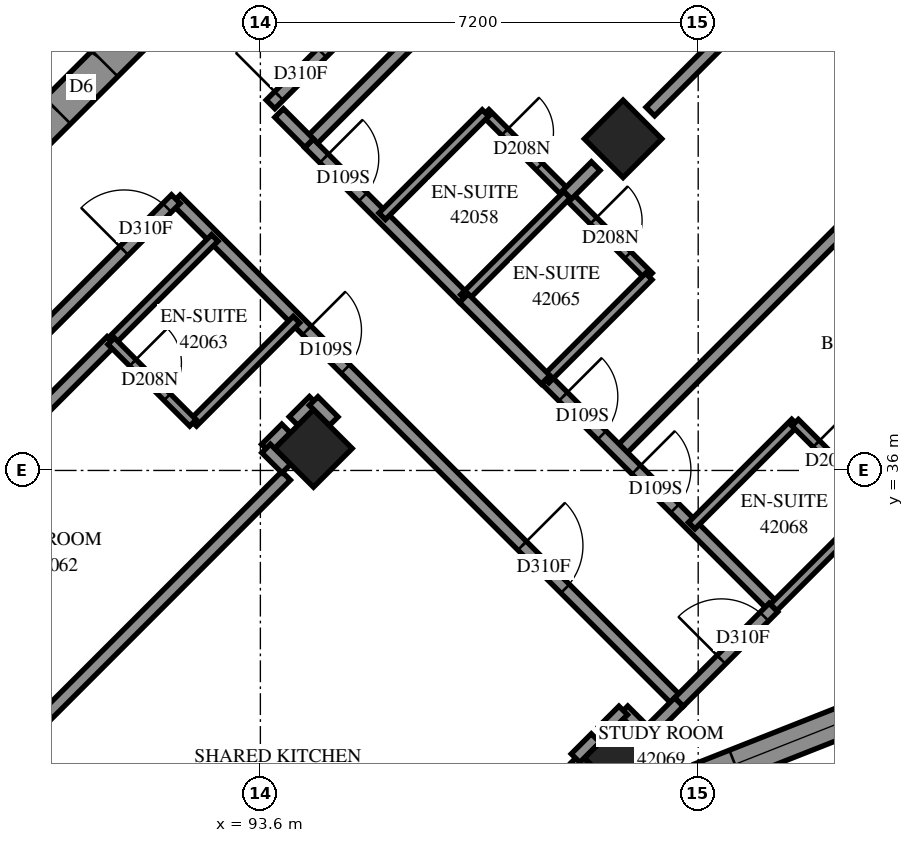
"""IFC4 building model, lengths in metres.
Left out: names, types, materials, properties, quantities, classifications, styles, units other than length and angle.
Written with IfcOpenShell. Run it as: python <this file> out.ifc"""

import sys

from ifc_helpers import new_model, si_unit, direction, frame, frame_2d, origin, origin_2d, place, context, subcontext, project, spatial, polyline, rectangle, outline, extrude, element, fill, save


model = new_model("IFC4")
c1 = context("Model", 3, precision=1e-05, world=origin(), true_north=direction((0.0, 1.0)))
c2 = subcontext(c1, "Body", "Model", "MODEL_VIEW")
j1 = project(units=[si_unit("LENGTHUNIT", "METRE"), si_unit("PLANEANGLEUNIT", "RADIAN")], contexts=[c1])
p1 = place(None, origin())
s1 = spatial("IfcSite", under=j1, at=p1, CompositionType="ELEMENT")
p2 = place(p1, origin())
s2 = spatial("IfcBuilding", under=s1, at=p2, CompositionType="ELEMENT")
p3 = place(p2, frame((0.0, 0.0, 155.8)))
s3 = spatial("IfcBuildingStorey", under=s2, at=p3, CompositionType="ELEMENT", Elevation=155.8)
for number, where, z_axis, x_axis in (
    (1, (99.565, 41.453, 0.0), (0.0, 0.0, 1.0), (0.707, -0.707, 0.0)),
    (2, (94.474, 36.362, 0.0), (0.0, 0.0, 1.0), (0.707, -0.707, 0.0)),
    (3, (99.565, 31.271, 0.0), (0.0, 0.0, 1.0), (0.707, -0.707, 0.0)),
):
    element("IfcColumn", number, at=place(p3, frame(where, z_axis=z_axis, x_axis=x_axis)), inside=s3, PredefinedType="COLUMN", context=c2, shape_type="SweptSolid", body=[
        extrude(rectangle(XDim=0.9, YDim=0.9, at=origin_2d()), origin(), (0.0, 0.0, 1.0), 3.1),
    ])
p4 = place(p3, frame((87.049, 38.695, -0.3), z_axis=(0.0, 0.0, 1.0), x_axis=(0.7071067812, 0.7071067812, 0.0)))
e4 = element("IfcWall", 4, at=p4, inside=s3, PredefinedType="SHEAR", context=c2, shape_type="SweptSolid", body=[
    extrude(rectangle(XDim=14.4, YDim=0.6, at=frame_2d((7.2, 0.0))), origin(), (0.0, 0.0, 1.0), 2.7),
])
p5 = place(p4, frame((4.55, 0.0, 0.3)))
e5 = element("IfcOpeningElement", 5, at=p5, cuts=e4, PredefinedType="OPENING", context=c2, shape_type="SweptSolid", body=[
    extrude(rectangle(XDim=1.1, YDim=2.1, at=frame_2d((0.55, 1.05))), frame((0.0, 0.31, 0.0), z_axis=(0.0, -1.0, 0.0), x_axis=(1.0, 0.0, 0.0)), (0.0, 0.0, 1.0), 0.62),
])
p6 = place(p4, frame((11.35, 0.0, 0.3)))
e6 = element("IfcOpeningElement", 6, at=p6, cuts=e4, PredefinedType="OPENING", context=c2, shape_type="SweptSolid", body=[
    extrude(rectangle(XDim=1.1, YDim=2.1, at=frame_2d((0.55, 1.05))), frame((0.0, 0.31, 0.0), z_axis=(0.0, -1.0, 0.0), x_axis=(1.0, 0.0, 0.0)), (0.0, 0.0, 1.0), 0.62),
])
p7 = place(p3, frame((100.828, 30.939, 0.0), z_axis=(0.0, 0.0, 1.0), x_axis=(0.930134551, 0.3672188953, 0.0)))
e7 = element("IfcWall", 7, at=p7, inside=s3, PredefinedType="SOLIDWALL", context=c2, shape_type="SweptSolid", body=[
    extrude(outline(polyline([(0.108, -0.25), (5.636, -0.25), (5.409, 0.25), (-0.108, 0.25), (0.108, -0.25)])), origin(), (0.0, 0.0, 1.0), 3.1),
])
p8 = place(p7, frame((0.62, 0.0, 0.45)))
e8 = element("IfcOpeningElement", 8, at=p8, cuts=e7, PredefinedType="OPENING", context=c2, shape_type="SweptSolid", body=[
    extrude(rectangle(XDim=2.8, YDim=2.5, at=frame_2d((1.4, 1.25))), frame((0.0, 0.26, 0.0), z_axis=(0.0, -1.0, 0.0), x_axis=(1.0, 0.0, 0.0)), (0.0, 0.0, 1.0), 0.52),
])
p9 = place(p3, frame((94.401, 41.383, 0.0), z_axis=(0.0, 0.0, 1.0), x_axis=(0.7071067812, 0.7071067812, 0.0)))
e9 = element("IfcWall", 9, at=p9, inside=s3, PredefinedType="PARTITIONING", context=c2, shape_type="SweptSolid", body=[
    extrude(rectangle(XDim=12.014, YDim=0.2, at=frame_2d((6.007, 0.0))), origin(), (0.0, 0.0, 1.0), 3.1),
])
p10 = place(p3, frame((92.209, 40.459, 0.0), z_axis=(0.0, 0.0, 1.0), x_axis=(0.7071067812, -0.7071067812, 0.0)))
e10 = element("IfcWall", 10, at=p10, inside=s3, PredefinedType="PARTITIONING", context=c2, shape_type="SweptSolid", body=[
    extrude(rectangle(XDim=11.698, YDim=0.2, at=frame_2d((5.849, 0.0))), origin(), (0.0, 0.0, 1.0), 3.1),
])
p11 = place(p10, frame((3.047, 0.0, 0.0)))
e11 = element("IfcOpeningElement", 11, at=p11, cuts=e10, PredefinedType="OPENING", context=c2, shape_type="SweptSolid", body=[
    extrude(rectangle(XDim=0.9, YDim=2.1, at=frame_2d((0.45, 1.05))), frame((0.0, 0.11, 0.0), z_axis=(0.0, -1.0, 0.0), x_axis=(1.0, 0.0, 0.0)), (0.0, 0.0, 1.0), 0.22),
])
p12 = place(p10, frame((8.056, 0.0, 0.0)))
e12 = element("IfcOpeningElement", 12, at=p12, cuts=e10, PredefinedType="OPENING", context=c2, shape_type="SweptSolid", body=[
    extrude(rectangle(XDim=1.0, YDim=2.1, at=frame_2d((0.5, 1.05))), frame((0.0, 0.11, 0.0), z_axis=(0.0, -1.0, 0.0), x_axis=(1.0, 0.0, 0.0)), (0.0, 0.0, 1.0), 0.22),
])
p13 = place(p3, frame((93.767, 42.021, 0.0), z_axis=(0.0, 0.0, 1.0), x_axis=(0.7071067812, 0.7071067812, 0.0)))
e13 = element("IfcWall", 13, at=p13, inside=s3, PredefinedType="PARTITIONING", context=c2, shape_type="SweptSolid", body=[
    extrude(rectangle(XDim=9.998, YDim=0.2, at=frame_2d((4.999, 0.0))), origin(), (0.0, 0.0, 1.0), 3.1),
])
p14 = place(p13, frame((0.196, 0.0, 0.0)))
e14 = element("IfcOpeningElement", 14, at=p14, cuts=e13, PredefinedType="OPENING", context=c2, shape_type="SweptSolid", body=[
    extrude(rectangle(XDim=1.0, YDim=2.1, at=frame_2d((0.5, 1.05))), frame((0.0, 0.11, 0.0), z_axis=(0.0, -1.0, 0.0), x_axis=(1.0, 0.0, 0.0)), (0.0, 0.0, 1.0), 0.22),
])
p15 = place(p3, frame((86.837, 35.091, 0.0), z_axis=(0.0, 0.0, 1.0), x_axis=(0.7071067812, 0.7071067812, 0.0)))
e15 = element("IfcWall", 15, at=p15, inside=s3, PredefinedType="PARTITIONING", context=c2, shape_type="SweptSolid", body=[
    extrude(rectangle(XDim=7.597, YDim=0.2, at=frame_2d((3.799, 0.0))), origin(), (0.0, 0.0, 1.0), 3.1),
])
p16 = place(p15, frame((6.395, 0.0, 0.0)))
e16 = element("IfcOpeningElement", 16, at=p16, cuts=e15, PredefinedType="OPENING", context=c2, shape_type="SweptSolid", body=[
    extrude(rectangle(XDim=1.0, YDim=2.1, at=frame_2d((0.5, 1.05))), frame((0.0, 0.11, 0.0), z_axis=(0.0, -1.0, 0.0), x_axis=(1.0, 0.0, 0.0)), (0.0, 0.0, 1.0), 0.22),
])
p17 = place(p3, frame((86.33, 33.311, 0.0), z_axis=(0.0, 0.0, 1.0), x_axis=(0.7071067812, 0.7071067812, 0.0)))
e17 = element("IfcWall", 17, at=p17, inside=s3, PredefinedType="PARTITIONING", context=c2, shape_type="SweptSolid", body=[
    extrude(rectangle(XDim=6.816, YDim=0.2, at=frame_2d((3.408, 0.0))), origin(), (0.0, 0.0, 1.0), 3.1),
])
p18 = place(p3, frame((99.494, 36.292, 0.0), z_axis=(0.0, 0.0, 1.0), x_axis=(0.7071067812, 0.7071067812, 0.0)))
e18 = element("IfcWall", 18, at=p18, inside=s3, PredefinedType="PARTITIONING", context=c2, shape_type="SweptSolid", body=[
    extrude(rectangle(XDim=6.799, YDim=0.2, at=frame_2d((3.4, 0.0))), origin(), (0.0, 0.0, 1.0), 3.1),
])
for number, where, z_axis, x_axis in (
    (19, (89.831, 31.721, 0.0), (0.0, 0.0, 1.0), (0.707, 0.707, 0.0)),
    (20, (100.013, 41.903, 0.0), (0.0, 0.0, 1.0), (0.707, 0.707, 0.0)),
):
    element("IfcWall", number, at=place(p3, frame(where, z_axis=z_axis, x_axis=x_axis)), inside=s3, PredefinedType="PARTITIONING", context=c2, shape_type="SweptSolid", body=[
        extrude(rectangle(XDim=5.928, YDim=0.2, at=frame_2d((2.964, 0.0))), origin(), (0.0, 0.0, 1.0), 3.1),
    ])
p19 = place(p3, frame((98.295, 37.497, 0.0), z_axis=(0.0, 0.0, 1.0), x_axis=(0.7071067812, -0.7071067812, 0.0)))
e21 = element("IfcWall", 21, at=p19, inside=s3, PredefinedType="PARTITIONING", context=c2, shape_type="SweptSolid", body=[
    extrude(rectangle(XDim=5.301, YDim=0.2, at=frame_2d((2.65, 0.0))), origin(), (0.0, 0.0, 1.0), 3.1),
])
p20 = place(p19, frame((0.401, 0.0, 0.0)))
e22 = element("IfcOpeningElement", 22, at=p20, cuts=e21, PredefinedType="OPENING", context=c2, shape_type="SweptSolid", body=[
    extrude(rectangle(XDim=0.9, YDim=2.1, at=frame_2d((0.45, 1.05))), frame((0.0, 0.11, 0.0), z_axis=(0.0, -1.0, 0.0), x_axis=(1.0, 0.0, 0.0)), (0.0, 0.0, 1.0), 0.22),
])
p21 = place(p19, frame((2.1, 0.0, 0.0)))
e23 = element("IfcOpeningElement", 23, at=p21, cuts=e21, PredefinedType="OPENING", context=c2, shape_type="SweptSolid", body=[
    extrude(rectangle(XDim=0.9, YDim=2.1, at=frame_2d((0.45, 1.05))), frame((0.0, 0.11, 0.0), z_axis=(0.0, -1.0, 0.0), x_axis=(1.0, 0.0, 0.0)), (0.0, 0.0, 1.0), 0.22),
])
p22 = place(p3, frame((97.305, 41.881, 0.0), z_axis=(0.0, 0.0, 1.0), x_axis=(0.7067382634, -0.707475107, 0.0)))
e24 = element("IfcWall", 24, at=p22, inside=s3, PredefinedType="PARTITIONING", context=c2, shape_type="SweptSolid", body=[
    extrude(rectangle(XDim=3.8, YDim=0.15, at=frame_2d((1.9, 0.0))), origin(), (0.0, 0.0, 1.0), 3.1),
])
p23 = place(p22, frame((0.445, 0.0, 0.0)))
e25 = element("IfcOpeningElement", 25, at=p23, cuts=e24, PredefinedType="OPENING", context=c2, shape_type="SweptSolid", body=[
    extrude(rectangle(XDim=0.8, YDim=2.1, at=frame_2d((0.4, 1.05))), frame((0.0, 0.085, 0.0), z_axis=(0.0, -1.0, 0.0), x_axis=(1.0, 0.0, 0.0)), (0.0, 0.0, 1.0), 0.17),
])
p24 = place(p22, frame((2.507, 0.0, 0.0)))
e26 = element("IfcOpeningElement", 26, at=p24, cuts=e24, PredefinedType="OPENING", context=c2, shape_type="SweptSolid", body=[
    extrude(rectangle(XDim=0.8, YDim=2.1, at=frame_2d((0.4, 1.05))), frame((0.0, 0.085, 0.0), z_axis=(0.0, -1.0, 0.0), x_axis=(1.0, 0.0, 0.0)), (0.0, 0.0, 1.0), 0.17),
])
p25 = place(p3, frame((94.399, 41.379, 0.0), z_axis=(0.0, 0.0, 1.0), x_axis=(0.7071067812, -0.7071067812, 0.0)))
e27 = element("IfcWall", 27, at=p25, inside=s3, PredefinedType="PARTITIONING", context=c2, shape_type="SweptSolid", body=[
    extrude(rectangle(XDim=3.601, YDim=0.2, at=frame_2d((1.8, 0.0))), origin(), (0.0, 0.0, 1.0), 3.1),
])
p26 = place(p25, frame((0.35, 0.0, 0.0)))
e28 = element("IfcOpeningElement", 28, at=p26, cuts=e27, PredefinedType="OPENING", context=c2, shape_type="SweptSolid", body=[
    extrude(rectangle(XDim=0.9, YDim=2.1, at=frame_2d((0.45, 1.05))), frame((0.0, 0.11, 0.0), z_axis=(0.0, -1.0, 0.0), x_axis=(1.0, 0.0, 0.0)), (0.0, 0.0, 1.0), 0.22),
])
for number, where, z_axis, x_axis in (
    (29, (95.603, 40.181, 0.0), (0.0, 0.0, 1.0), (0.707, 0.707, 0.0)),
    (30, (96.947, 38.837, 0.0), (0.0, 0.0, 1.0), (0.707, 0.707, 0.0)),
):
    element("IfcWall", number, at=place(p3, frame(where, z_axis=z_axis, x_axis=x_axis)), inside=s3, PredefinedType="PARTITIONING", context=c2, shape_type="SweptSolid", body=[
        extrude(rectangle(XDim=2.401, YDim=0.15, at=frame_2d((1.201, 0.0))), origin(), (0.0, 0.0, 1.0), 3.1),
    ])
for number, where, z_axis, x_axis in (
    (31, (100.693, 35.093, 0.0), (0.0, 0.0, 1.0), (0.708, 0.707, 0.0)),
    (32, (91.152, 38.128, 0.0), (0.0, 0.0, 1.0), (0.708, 0.707, 0.0)),
    (33, (92.497, 36.783, 0.0), (0.0, 0.0, 1.0), (0.707, 0.708, 0.0)),
):
    element("IfcWall", number, at=place(p3, frame(where, z_axis=z_axis, x_axis=x_axis)), inside=s3, PredefinedType="PARTITIONING", context=c2, shape_type="SweptSolid", body=[
        extrude(rectangle(XDim=2.4, YDim=0.15, at=frame_2d((1.2, 0.0))), origin(), (0.0, 0.0, 1.0), 3.1),
    ])
p27 = place(p3, frame((98.291, 37.495, 0.0), z_axis=(0.0, 0.0, 1.0), x_axis=(0.7071067812, 0.7071067812, 0.0)))
e34 = element("IfcWall", 34, at=p27, inside=s3, PredefinedType="PARTITIONING", context=c2, shape_type="SweptSolid", body=[
    extrude(rectangle(XDim=2.398, YDim=0.15, at=frame_2d((1.199, 0.0))), origin(), (0.0, 0.0, 1.0), 3.1),
])
p28 = place(p3, frame((102.039, 33.747, 0.0), z_axis=(0.0, 0.0, 1.0), x_axis=(0.7071067812, 0.7071067812, 0.0)))
e35 = element("IfcWall", 35, at=p28, inside=s3, PredefinedType="PARTITIONING", context=c2, shape_type="SweptSolid", body=[
    extrude(rectangle(XDim=2.398, YDim=0.15, at=frame_2d((1.199, 0.0))), origin(), (0.0, 0.0, 1.0), 2.6),
])
p29 = place(p3, frame((100.483, 32.191, 0.0), z_axis=(0.0, 0.0, 1.0), x_axis=(0.7071067812, 0.7071067812, 0.0)))
e36 = element("IfcWall", 36, at=p29, inside=s3, PredefinedType="PARTITIONING", context=c2, shape_type="SweptSolid", body=[
    extrude(rectangle(XDim=2.198, YDim=0.2, at=frame_2d((1.099, 0.0))), origin(), (0.0, 0.0, 1.0), 2.6),
])
p30 = place(p29, frame((0.987, 0.0, 0.0)))
e37 = element("IfcOpeningElement", 37, at=p30, cuts=e36, PredefinedType="OPENING", context=c2, shape_type="SweptSolid", body=[
    extrude(rectangle(XDim=1.0, YDim=2.1, at=frame_2d((0.5, 1.05))), frame((0.0, 0.11, 0.0), z_axis=(0.0, -1.0, 0.0), x_axis=(1.0, 0.0, 0.0)), (0.0, 0.0, 1.0), 0.22),
])
p31 = place(p3, frame((91.147, 38.127, 0.0), z_axis=(0.0, 0.0, 1.0), x_axis=(0.7071067812, -0.7071067812, 0.0)))
e38 = element("IfcWall", 38, at=p31, inside=s3, PredefinedType="PARTITIONING", context=c2, shape_type="SweptSolid", body=[
    extrude(rectangle(XDim=1.901, YDim=0.15, at=frame_2d((0.95, 0.0))), origin(), (0.0, 0.0, 1.0), 3.1),
])
p32 = place(p31, frame((0.502, 0.0, 0.0)))
e39 = element("IfcOpeningElement", 39, at=p32, cuts=e38, PredefinedType="OPENING", context=c2, shape_type="SweptSolid", body=[
    extrude(rectangle(XDim=0.8, YDim=2.1, at=frame_2d((0.4, 1.05))), frame((0.0, 0.085, 0.0), z_axis=(0.0, -1.0, 0.0), x_axis=(1.0, 0.0, 0.0)), (0.0, 0.0, 1.0), 0.17),
])
p33 = place(p3, frame((96.946, 38.834, 0.0), z_axis=(0.0, 0.0, 1.0), x_axis=(0.7076330979, -0.7065800724, 0.0)))
e40 = element("IfcWall", 40, at=p33, inside=s3, PredefinedType="PARTITIONING", context=c2, shape_type="SweptSolid", body=[
    extrude(rectangle(XDim=1.899, YDim=0.2, at=frame_2d((0.95, 0.0))), origin(), (0.0, 0.0, 1.0), 3.1),
])
p34 = place(p3, frame((102.394, 36.786, 0.0), z_axis=(0.0, 0.0, 1.0), x_axis=(0.7065800724, -0.7076330979, 0.0)))
e41 = element("IfcWall", 41, at=p34, inside=s3, PredefinedType="PARTITIONING", context=c2, shape_type="SweptSolid", body=[
    extrude(rectangle(XDim=1.899, YDim=0.15, at=frame_2d((0.95, 0.0))), origin(), (0.0, 0.0, 1.0), 3.1),
])
p35 = place(p34, frame((0.492, 0.0, 0.0)))
e42 = element("IfcOpeningElement", 42, at=p35, cuts=e41, PredefinedType="OPENING", context=c2, shape_type="SweptSolid", body=[
    extrude(rectangle(XDim=0.8, YDim=2.1, at=frame_2d((0.4, 1.05))), frame((0.0, 0.085, 0.0), z_axis=(0.0, -1.0, 0.0), x_axis=(1.0, 0.0, 0.0)), (0.0, 0.0, 1.0), 0.17),
])
p36 = place(p3, frame((93.909, 41.879, 0.0), z_axis=(0.0, 0.0, 1.0), x_axis=(0.7056768426, -0.7085338339, 0.0)))
e43 = element("IfcWall", 43, at=p36, inside=s3, PredefinedType="PARTITIONING", context=c2, shape_type="SweptSolid", body=[
    extrude(rectangle(XDim=0.7, YDim=0.2, at=frame_2d((0.35, 0.0))), origin(), (0.0, 0.0, 1.0), 3.1),
])
p37 = place(p3, frame((98.645, 40.535, 0.0), z_axis=(0.0, 0.0, 1.0), x_axis=(0.7071067812, 0.7071067812, 0.0)))
e44 = element("IfcWall", 44, at=p37, inside=s3, PredefinedType="PARTITIONING", context=c2, shape_type="SweptSolid", body=[
    extrude(rectangle(XDim=0.665, YDim=0.2, at=frame_2d((0.332, 0.0))), origin(), (0.0, 0.0, 1.0), 3.1),
])
p38 = place(p3, frame((100.013, 31.721, 0.0), z_axis=(0.0, 0.0, 1.0), x_axis=(0.7071067812, 0.7071067812, 0.0)))
e45 = element("IfcWall", 45, at=p38, inside=s3, PredefinedType="PARTITIONING", context=c2, shape_type="SweptSolid", body=[
    extrude(rectangle(XDim=0.665, YDim=0.2, at=frame_2d((0.332, 0.0))), origin(), (0.0, 0.0, 1.0), 2.6),
])
p39 = place(p3, frame((99.571, 32.055, 0.0), z_axis=(0.0, 0.0, 1.0), x_axis=(0.7092270271, -0.7049801586, 0.0)))
e46 = element("IfcWall", 46, at=p39, inside=s3, PredefinedType="PARTITIONING", context=c2, shape_type="SweptSolid", body=[
    extrude(rectangle(XDim=0.471, YDim=0.2, at=frame_2d((0.235, 0.0))), origin(), (0.0, 0.0, 1.0), 3.1),
])
for number, where, z_axis, x_axis in (
    (47, (94.145, 36.813, 0.0), (0.0, 0.0, 1.0), (0.707, 0.707, 0.0)),
    (48, (99.235, 31.721, 0.0), (0.0, 0.0, 1.0), (0.707, 0.707, 0.0)),
    (49, (93.691, 36.359, 0.0), (0.0, 0.0, 1.0), (0.707, 0.707, 0.0)),
):
    element("IfcWall", number, at=place(p3, frame(where, z_axis=z_axis, x_axis=x_axis)), inside=s3, PredefinedType="PARTITIONING", context=c2, shape_type="SweptSolid", body=[
        extrude(rectangle(XDim=0.469, YDim=0.2, at=frame_2d((0.235, 0.0))), origin(), (0.0, 0.0, 1.0), 3.1),
    ])
for number, where, z_axis, x_axis in (
    (50, (94.476, 37.142, 0.0), (0.0, 0.0, 1.0), (0.705, -0.709, 0.0)),
    (51, (93.695, 36.361, 0.0), (0.0, 0.0, 1.0), (0.709, -0.705, 0.0)),
    (52, (98.781, 31.265, 0.0), (0.0, 0.0, 1.0), (0.705, -0.709, 0.0)),
):
    element("IfcWall", number, at=place(p3, frame(where, z_axis=z_axis, x_axis=x_axis)), inside=s3, PredefinedType="PARTITIONING", context=c2, shape_type="SweptSolid", body=[
        extrude(rectangle(XDim=0.468, YDim=0.2, at=frame_2d((0.234, 0.0))), origin(), (0.0, 0.0, 1.0), 3.1),
    ])
p40 = place(p3, frame((98.783, 31.269, 0.0), z_axis=(0.0, 0.0, 1.0), x_axis=(0.7071067812, 0.7071067812, 0.0)))
e53 = element("IfcWall", 53, at=p40, inside=s3, PredefinedType="PARTITIONING", context=c2, shape_type="SweptSolid", body=[
    extrude(rectangle(XDim=0.467, YDim=0.2, at=frame_2d((0.233, 0.0))), origin(), (0.0, 0.0, 1.0), 3.1),
])
p41 = place(p8, origin())
e54 = element("IfcWindow", 54, at=p41, inside=s3, PartitioningType="SINGLE_PANEL", PredefinedType="WINDOW", context=c2, shape_type="SweptSolid", body=[
    extrude(rectangle(XDim=2.8, YDim=2.5, at=frame_2d((1.4, 1.25))), frame((0.0, 0.18, 0.0), z_axis=(0.0, -1.0, 0.0), x_axis=(1.0, 0.0, 0.0)), (0.0, 0.0, 1.0), 0.06),
])
fill(e8, e54)
p42 = place(p5, origin())
e55 = element("IfcDoor", 55, at=p42, inside=s3, OperationType="DOUBLE_DOOR_SINGLE_SWING", PredefinedType="DOOR", context=c2, shape_type="SweptSolid", body=[
    extrude(rectangle(XDim=1.1, YDim=2.1, at=frame_2d((0.55, 1.05))), frame((0.0, 0.025, 0.0), z_axis=(0.0, -1.0, 0.0), x_axis=(1.0, 0.0, 0.0)), (0.0, 0.0, 1.0), 0.05),
])
fill(e5, e55)
p43 = place(p14, origin())
e56 = element("IfcDoor", 56, at=p43, inside=s3, OperationType="SINGLE_SWING_LEFT", PredefinedType="DOOR", context=c2, shape_type="SweptSolid", body=[
    extrude(rectangle(XDim=1.0, YDim=2.1, at=frame_2d((0.5, 1.05))), frame((0.0, 0.025, 0.0), z_axis=(0.0, -1.0, 0.0), x_axis=(1.0, 0.0, 0.0)), (0.0, 0.0, 1.0), 0.05),
])
fill(e14, e56)
p44 = place(p26, origin())
e57 = element("IfcDoor", 57, at=p44, inside=s3, OperationType="SINGLE_SWING_RIGHT", PredefinedType="DOOR", context=c2, shape_type="SweptSolid", body=[
    extrude(rectangle(XDim=0.9, YDim=2.1, at=frame_2d((0.45, 1.05))), frame((0.0, 0.025, 0.0), z_axis=(0.0, -1.0, 0.0), x_axis=(1.0, 0.0, 0.0)), (0.0, 0.0, 1.0), 0.05),
])
fill(e28, e57)
p45 = place(p23, origin())
e58 = element("IfcDoor", 58, at=p45, inside=s3, OperationType="SINGLE_SWING_RIGHT", PredefinedType="DOOR", context=c2, shape_type="SweptSolid", body=[
    extrude(rectangle(XDim=0.8, YDim=2.1, at=frame_2d((0.4, 1.05))), frame((0.0, 0.025, 0.0), z_axis=(0.0, -1.0, 0.0), x_axis=(1.0, 0.0, 0.0)), (0.0, 0.0, 1.0), 0.05),
])
fill(e25, e58)
p46 = place(p16, origin())
e59 = element("IfcDoor", 59, at=p46, inside=s3, OperationType="SINGLE_SWING_LEFT", PredefinedType="DOOR", context=c2, shape_type="SweptSolid", body=[
    extrude(rectangle(XDim=1.0, YDim=2.1, at=frame_2d((0.5, 1.05))), frame((0.0, 0.025, 0.0), z_axis=(0.0, -1.0, 0.0), x_axis=(1.0, 0.0, 0.0)), (0.0, 0.0, 1.0), 0.05),
])
fill(e16, e59)
p47 = place(p11, origin())
e60 = element("IfcDoor", 60, at=p47, inside=s3, OperationType="SINGLE_SWING_LEFT", PredefinedType="DOOR", context=c2, shape_type="SweptSolid", body=[
    extrude(rectangle(XDim=0.9, YDim=2.1, at=frame_2d((0.45, 1.05))), frame((0.0, 0.025, 0.0), z_axis=(0.0, -1.0, 0.0), x_axis=(1.0, 0.0, 0.0)), (0.0, 0.0, 1.0), 0.05),
])
fill(e11, e60)
p48 = place(p32, origin())
e61 = element("IfcDoor", 61, at=p48, inside=s3, OperationType="SINGLE_SWING_RIGHT", PredefinedType="DOOR", context=c2, shape_type="SweptSolid", body=[
    extrude(rectangle(XDim=0.8, YDim=2.1, at=frame_2d((0.4, 1.05))), frame((0.0, 0.025, 0.0), z_axis=(0.0, -1.0, 0.0), x_axis=(1.0, 0.0, 0.0)), (0.0, 0.0, 1.0), 0.05),
])
fill(e39, e61)
p49 = place(p20, origin())
e62 = element("IfcDoor", 62, at=p49, inside=s3, OperationType="SINGLE_SWING_LEFT", PredefinedType="DOOR", context=c2, shape_type="SweptSolid", body=[
    extrude(rectangle(XDim=0.9, YDim=2.1, at=frame_2d((0.45, 1.05))), frame((0.0, 0.025, 0.0), z_axis=(0.0, -1.0, 0.0), x_axis=(1.0, 0.0, 0.0)), (0.0, 0.0, 1.0), 0.05),
])
fill(e22, e62)
p50 = place(p24, origin())
e63 = element("IfcDoor", 63, at=p50, inside=s3, OperationType="SINGLE_SWING_RIGHT", PredefinedType="DOOR", context=c2, shape_type="SweptSolid", body=[
    extrude(rectangle(XDim=0.8, YDim=2.1, at=frame_2d((0.4, 1.05))), frame((0.0, 0.025, 0.0), z_axis=(0.0, -1.0, 0.0), x_axis=(1.0, 0.0, 0.0)), (0.0, 0.0, 1.0), 0.05),
])
fill(e26, e63)
p51 = place(p12, origin())
e64 = element("IfcDoor", 64, at=p51, inside=s3, OperationType="SINGLE_SWING_RIGHT", PredefinedType="DOOR", context=c2, shape_type="SweptSolid", body=[
    extrude(rectangle(XDim=1.0, YDim=2.1, at=frame_2d((0.5, 1.05))), frame((0.0, 0.025, 0.0), z_axis=(0.0, -1.0, 0.0), x_axis=(1.0, 0.0, 0.0)), (0.0, 0.0, 1.0), 0.05),
])
fill(e12, e64)
p52 = place(p21, origin())
e65 = element("IfcDoor", 65, at=p52, inside=s3, OperationType="SINGLE_SWING_RIGHT", PredefinedType="DOOR", context=c2, shape_type="SweptSolid", body=[
    extrude(rectangle(XDim=0.9, YDim=2.1, at=frame_2d((0.45, 1.05))), frame((0.0, 0.025, 0.0), z_axis=(0.0, -1.0, 0.0), x_axis=(1.0, 0.0, 0.0)), (0.0, 0.0, 1.0), 0.05),
])
fill(e23, e65)
p53 = place(p35, origin())
e66 = element("IfcDoor", 66, at=p53, inside=s3, OperationType="SINGLE_SWING_RIGHT", PredefinedType="DOOR", context=c2, shape_type="SweptSolid", body=[
    extrude(rectangle(XDim=0.8, YDim=2.1, at=frame_2d((0.4, 1.05))), frame((0.0, 0.025, 0.0), z_axis=(0.0, -1.0, 0.0), x_axis=(1.0, 0.0, 0.0)), (0.0, 0.0, 1.0), 0.05),
])
fill(e42, e66)
p54 = place(p30, origin())
e67 = element("IfcDoor", 67, at=p54, inside=s3, OperationType="SINGLE_SWING_RIGHT", PredefinedType="DOOR", context=c2, shape_type="SweptSolid", body=[
    extrude(rectangle(XDim=1.0, YDim=2.1, at=frame_2d((0.5, 1.05))), frame((0.0, 0.025, 0.0), z_axis=(0.0, -1.0, 0.0), x_axis=(1.0, 0.0, 0.0)), (0.0, 0.0, 1.0), 0.05),
])
fill(e37, e67)
save(model, sys.argv[1])
